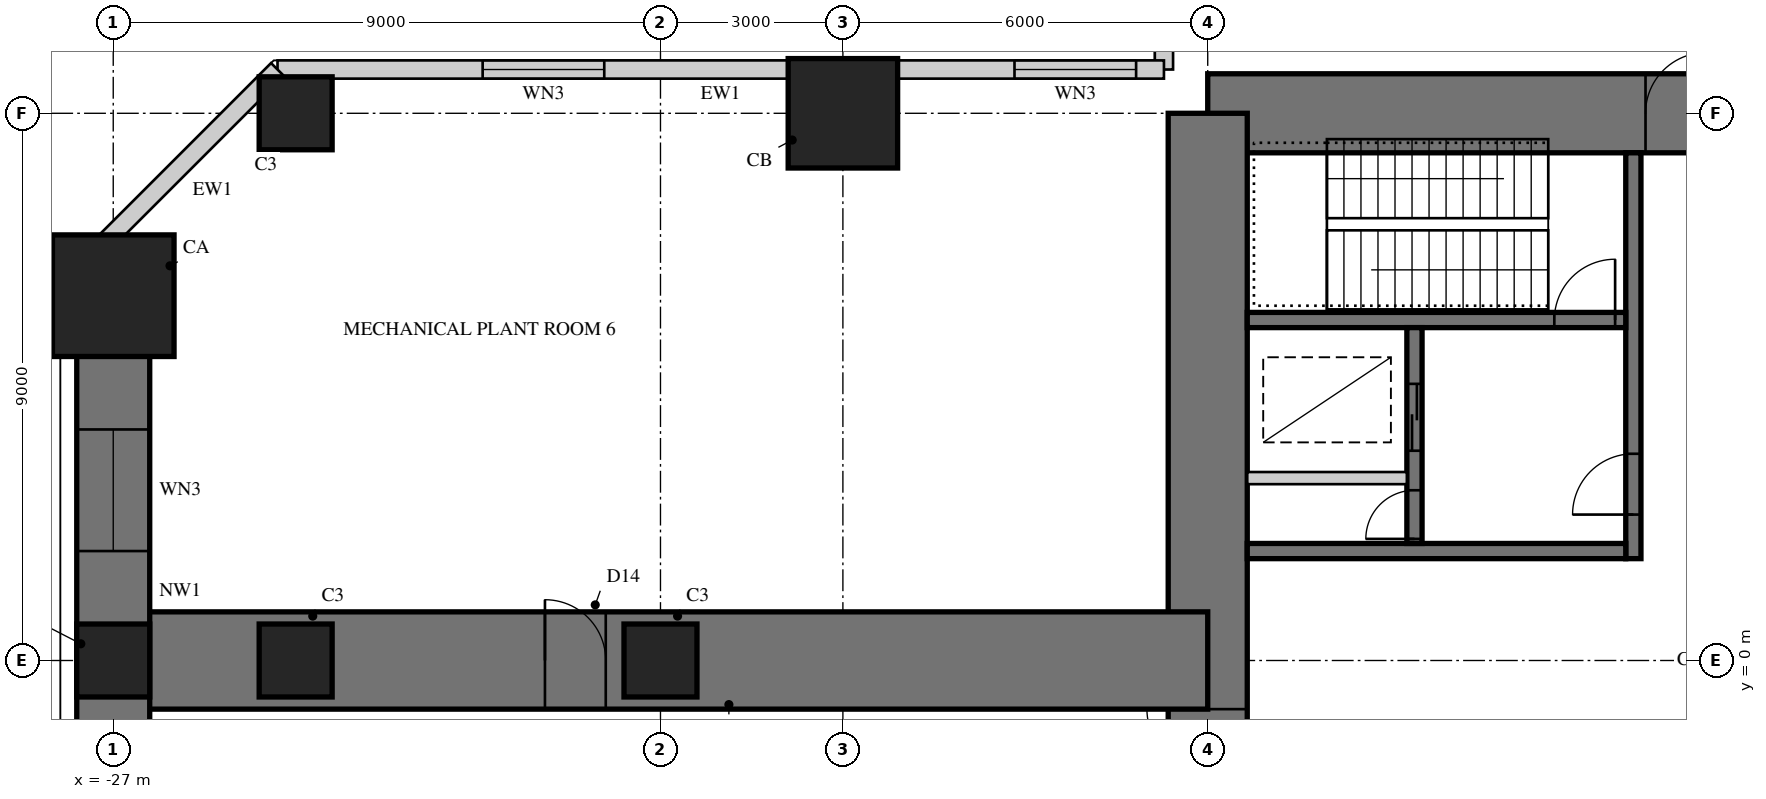
"""IFC4 building model, lengths in metres.
Left out: names, types, materials, properties, quantities, classifications, styles, units other than length and angle.
Written with IfcOpenShell. Run it as: python <this file> out.ifc"""

import sys

from ifc_helpers import new_model, si_unit, direction, frame, frame_2d, origin, origin_2d, place, context, subcontext, project, spatial, rectangle, hollow_rectangle, extrude, element, fill, save


model = new_model("IFC4")
c1 = context("Model", 3, precision=1e-05, world=origin(), true_north=direction((0.0, 1.0)))
c2 = subcontext(c1, "Body", "Model", "MODEL_VIEW")
j1 = project(units=[si_unit("LENGTHUNIT", "METRE"), si_unit("PLANEANGLEUNIT", "RADIAN")], contexts=[c1])
p1 = place(None, origin())
s1 = spatial("IfcSite", under=j1, at=p1, CompositionType="ELEMENT")
p2 = place(p1, origin())
s2 = spatial("IfcBuilding", under=s1, at=p2, CompositionType="ELEMENT")
p3 = place(p2, frame((0.0, 0.0, 18.5)))
s3 = spatial("IfcBuildingStorey", under=s2, at=p3, CompositionType="ELEMENT", Elevation=18.5)
p4 = place(p3, frame((9.0, 9.0, 0.0), z_axis=(0.0, 0.0, 1.0), x_axis=(-1.0, 0.0, 0.0)))
e1 = element("IfcWall", 1, at=p4, inside=s3, PredefinedType="SHEAR", context=c2, shape_type="SweptSolid", body=[
    extrude(rectangle(XDim=18.0, YDim=1.3, at=frame_2d((9.0, 0.0))), origin(), (0.0, 0.0, 1.0), 5.0),
])
p5 = place(p4, frame((9.8, 0.0, 0.0)))
e2 = element("IfcOpeningElement", 2, at=p5, cuts=e1, PredefinedType="OPENING", context=c2, shape_type="SweptSolid", body=[
    extrude(rectangle(XDim=1.0, YDim=2.4, at=frame_2d((0.5, 1.2))), frame((0.0, 0.66, 0.0), z_axis=(0.0, -1.0, 0.0), x_axis=(1.0, 0.0, 0.0)), (0.0, 0.0, 1.0), 1.32),
])
p6 = place(p3, frame((-9.0, 9.0, 0.0), z_axis=(0.0, 0.0, 1.0), x_axis=(0.0, -1.0, 0.0)))
e3 = element("IfcWall", 3, at=p6, inside=s3, PredefinedType="SHEAR", context=c2, shape_type="SweptSolid", body=[
    extrude(rectangle(XDim=18.0, YDim=1.3, at=frame_2d((9.0, 0.0))), origin(), (0.0, 0.0, 1.0), 5.0),
])
p7 = place(p6, frame((9.8, 0.0, 0.0)))
e4 = element("IfcOpeningElement", 4, at=p7, cuts=e3, PredefinedType="OPENING", context=c2, shape_type="SweptSolid", body=[
    extrude(rectangle(XDim=1.0, YDim=2.4, at=frame_2d((0.5, 1.2))), frame((0.0, 0.66, 0.0), z_axis=(0.0, -1.0, 0.0), x_axis=(1.0, 0.0, 0.0)), (0.0, 0.0, 1.0), 1.32),
])
p8 = place(p3, frame((-2.0, 1.675, 0.0), z_axis=(0.0, 0.0, 1.0), x_axis=(0.0, 1.0, 0.0)))
e5 = element("IfcWall", 5, at=p8, inside=s3, PredefinedType="SHEAR", context=c2, shape_type="SweptSolid", body=[
    extrude(rectangle(XDim=6.675, YDim=0.25, at=frame_2d((3.337, 0.0))), origin(), (0.0, 0.0, 1.0), 5.0),
])
p9 = place(p8, frame((0.725, 0.0, 0.0)))
e6 = element("IfcOpeningElement", 6, at=p9, cuts=e5, PredefinedType="OPENING", context=c2, shape_type="SweptSolid", body=[
    extrude(rectangle(XDim=1.0, YDim=2.1, at=frame_2d((0.5, 1.05))), frame((0.0, 0.135, 0.0), z_axis=(0.0, -1.0, 0.0), x_axis=(1.0, 0.0, 0.0)), (0.0, 0.0, 1.0), 0.27),
])
p10 = place(p3, frame((-2.125, 1.8, 0.0), z_axis=(0.0, 0.0, 1.0), x_axis=(-1.0, 0.0, 0.0)))
e7 = element("IfcWall", 7, at=p10, inside=s3, PredefinedType="SHEAR", context=c2, shape_type="SweptSolid", body=[
    extrude(rectangle(XDim=6.225, YDim=0.25, at=frame_2d((3.113, 0.0))), origin(), (0.0, 0.0, 1.0), 5.0),
])
p11 = place(p3, frame((-2.125, 5.6, 0.0), z_axis=(0.0, 0.0, 1.0), x_axis=(-1.0, 0.0, 0.0)))
e8 = element("IfcWall", 8, at=p11, inside=s3, PredefinedType="SHEAR", context=c2, shape_type="SweptSolid", body=[
    extrude(rectangle(XDim=6.225, YDim=0.25, at=frame_2d((3.113, 0.0))), origin(), (0.0, 0.0, 1.0), 5.0),
])
p12 = place(p11, frame((0.175, 0.0, 0.0)))
e9 = element("IfcOpeningElement", 9, at=p12, cuts=e8, PredefinedType="OPENING", context=c2, shape_type="SweptSolid", body=[
    extrude(rectangle(XDim=1.0, YDim=2.1, at=frame_2d((0.5, 1.05))), frame((0.0, 0.135, 0.0), z_axis=(0.0, -1.0, 0.0), x_axis=(1.0, 0.0, 0.0)), (0.0, 0.0, 1.0), 0.27),
])
p13 = place(p3, frame((-5.6, 1.925, 0.0), z_axis=(0.0, 0.0, 1.0), x_axis=(0.0, 1.0, 0.0)))
e10 = element("IfcWall", 10, at=p13, inside=s3, PredefinedType="SHEAR", context=c2, shape_type="SweptSolid", body=[
    extrude(rectangle(XDim=3.55, YDim=0.25, at=frame_2d((1.775, 0.0))), origin(), (0.0, 0.0, 1.0), 5.0),
])
p14 = place(p13, frame((1.525, 0.0, 0.0)))
e11 = element("IfcOpeningElement", 11, at=p14, cuts=e10, PredefinedType="OPENING", context=c2, shape_type="SweptSolid", body=[
    extrude(rectangle(XDim=1.1, YDim=2.2, at=frame_2d((0.55, 1.1))), frame((0.0, 0.135, 0.0), z_axis=(0.0, -1.0, 0.0), x_axis=(1.0, 0.0, 0.0)), (0.0, 0.0, 1.0), 0.27),
])
p15 = place(p13, frame((0.075, 0.0, 0.0)))
e12 = element("IfcOpeningElement", 12, at=p15, cuts=e10, PredefinedType="OPENING", context=c2, shape_type="SweptSolid", body=[
    extrude(rectangle(XDim=0.8, YDim=2.1, at=frame_2d((0.4, 1.05))), frame((0.0, 0.135, 0.0), z_axis=(0.0, -1.0, 0.0), x_axis=(1.0, 0.0, 0.0)), (0.0, 0.0, 1.0), 0.27),
])
p16 = place(p3, frame((-5.725, 3.0, 0.0), z_axis=(0.0, 0.0, 1.0), x_axis=(-1.0, 0.0, 0.0)))
e13 = element("IfcWall", 13, at=p16, inside=s3, PredefinedType="PARTITIONING", context=c2, shape_type="SweptSolid", body=[
    extrude(rectangle(XDim=2.625, YDim=0.2, at=frame_2d((1.312, 0.0))), origin(), (0.0, 0.0, 1.0), 5.0),
])
p17 = place(p3, frame((-9.0, 0.0, 0.0), z_axis=(0.0, 0.0, 1.0), x_axis=(-1.0, 0.0, 0.0)))
e14 = element("IfcWall", 14, at=p17, inside=s3, PredefinedType="SHEAR", context=c2, shape_type="SweptSolid", body=[
    extrude(rectangle(XDim=18.0, YDim=1.6, at=frame_2d((9.0, 0.0))), origin(), (0.0, 0.0, 1.0), 5.0),
])
p18 = place(p17, frame((9.9, 0.0, 0.0)))
e15 = element("IfcOpeningElement", 15, at=p18, cuts=e14, PredefinedType="OPENING", context=c2, shape_type="SweptSolid", body=[
    extrude(rectangle(XDim=1.0, YDim=2.2, at=frame_2d((0.5, 1.1))), frame((0.0, 0.81, 0.0), z_axis=(0.0, -1.0, 0.0), x_axis=(1.0, 0.0, 0.0)), (0.0, 0.0, 1.0), 1.62),
])
p19 = place(p3, frame((-27.0, 6.0, 0.0), z_axis=(0.0, 0.0, 1.0), x_axis=(0.0, -1.0, 0.0)))
e16 = element("IfcWall", 16, at=p19, inside=s3, PredefinedType="SHEAR", context=c2, shape_type="SweptSolid", body=[
    extrude(rectangle(XDim=12.0, YDim=1.2, at=frame_2d((6.0, 0.0))), origin(), (0.0, 0.0, 1.0), 5.0),
])
p20 = place(p19, frame((2.2, 0.0, 0.8)))
e17 = element("IfcOpeningElement", 17, at=p20, cuts=e16, PredefinedType="OPENING", context=c2, shape_type="SweptSolid", body=[
    extrude(rectangle(XDim=2.0, YDim=2.5, at=frame_2d((1.0, 1.25))), frame((0.0, 0.61, 0.0), z_axis=(0.0, -1.0, 0.0), x_axis=(1.0, 0.0, 0.0)), (0.0, 0.0, 1.0), 1.22),
])
p21 = place(p19, frame((7.8, 0.0, 0.8)))
e18 = element("IfcOpeningElement", 18, at=p21, cuts=e16, PredefinedType="OPENING", context=c2, shape_type="SweptSolid", body=[
    extrude(rectangle(XDim=2.0, YDim=2.5, at=frame_2d((1.0, 1.25))), frame((0.0, 0.61, 0.0), z_axis=(0.0, -1.0, 0.0), x_axis=(1.0, 0.0, 0.0)), (0.0, 0.0, 1.0), 1.22),
])
p22 = place(p3, frame((-15.0, 9.0, 0.0), z_axis=(0.0, 0.0, 1.0), x_axis=(1.0, 0.0, 0.0)))
e19 = element("IfcColumn", 19, at=p22, inside=s3, PredefinedType="COLUMN", context=c2, shape_type="SweptSolid", body=[
    extrude(rectangle(XDim=1.8, YDim=1.8, at=origin_2d()), origin(), (0.0, 0.0, 1.0), 5.0),
])
p23 = place(p3, frame((-24.0, 9.0, 0.0), z_axis=(0.0, 0.0, 1.0), x_axis=(1.0, 0.0, 0.0)))
e20 = element("IfcColumn", 20, at=p23, inside=s3, PredefinedType="COLUMN", context=c2, shape_type="SweptSolid", body=[
    extrude(rectangle(XDim=1.2, YDim=1.2, at=origin_2d()), origin(), (0.0, 0.0, 1.0), 5.0),
])
p24 = place(p3, frame((-27.0, 6.0, 0.0), z_axis=(0.0, 0.0, 1.0), x_axis=(1.0, 0.0, 0.0)))
e21 = element("IfcColumn", 21, at=p24, inside=s3, PredefinedType="COLUMN", context=c2, shape_type="SweptSolid", body=[
    extrude(rectangle(XDim=2.0, YDim=2.0, at=origin_2d()), origin(), (0.0, 0.0, 1.0), 5.0),
])
for number, where, z_axis, x_axis in (
    (22, (-27.0, 0.0, 0.0), (0.0, 0.0, 1.0), (1.0, 0.0, 0.0)),
    (23, (-18.0, 0.0, 0.0), (0.0, 0.0, 1.0), (1.0, 0.0, 0.0)),
    (24, (-24.0, 0.0, 0.0), (0.0, 0.0, 1.0), (1.0, 0.0, 0.0)),
):
    element("IfcColumn", number, at=place(p3, frame(where, z_axis=z_axis, x_axis=x_axis)), inside=s3, PredefinedType="COLUMN", context=c2, shape_type="SweptSolid", body=[
        extrude(rectangle(XDim=1.2, YDim=1.2, at=origin_2d()), origin(), (0.0, 0.0, 1.0), 5.0),
    ])
p25 = place(p3, frame((-9.72, 24.298, 0.0), z_axis=(0.0, 0.0, 1.0), x_axis=(0.0, -1.0, 0.0)))
e25 = element("IfcWall", 25, at=p25, inside=s3, PredefinedType="SOLIDWALL", context=c2, shape_type="SweptSolid", body=[
    extrude(rectangle(XDim=14.578, YDim=0.3, at=frame_2d((7.289, 0.0))), origin(), (0.0, 0.0, 1.0), 4.8),
])
p26 = place(p25, frame((3.374, 0.0, 0.8)))
e26 = element("IfcOpeningElement", 26, at=p26, cuts=e25, PredefinedType="OPENING", context=c2, shape_type="SweptSolid", body=[
    extrude(rectangle(XDim=2.0, YDim=2.5, at=frame_2d((1.0, 1.25))), frame((0.0, 0.16, 0.0), z_axis=(0.0, -1.0, 0.0), x_axis=(1.0, 0.0, 0.0)), (0.0, 0.0, 1.0), 0.32),
])
p27 = place(p25, frame((6.289, 0.0, 0.8)))
e27 = element("IfcOpeningElement", 27, at=p27, cuts=e25, PredefinedType="OPENING", context=c2, shape_type="SweptSolid", body=[
    extrude(rectangle(XDim=2.0, YDim=2.5, at=frame_2d((1.0, 1.25))), frame((0.0, 0.16, 0.0), z_axis=(0.0, -1.0, 0.0), x_axis=(1.0, 0.0, 0.0)), (0.0, 0.0, 1.0), 0.32),
])
p28 = place(p25, frame((12.12, 0.0, 0.8)))
e28 = element("IfcOpeningElement", 28, at=p28, cuts=e25, PredefinedType="OPENING", context=c2, shape_type="SweptSolid", body=[
    extrude(rectangle(XDim=2.0, YDim=2.5, at=frame_2d((1.0, 1.25))), frame((0.0, 0.16, 0.0), z_axis=(0.0, -1.0, 0.0), x_axis=(1.0, 0.0, 0.0)), (0.0, 0.0, 1.0), 0.32),
])
p29 = place(p3, frame((-9.72, 9.72, 0.0), z_axis=(0.0, 0.0, 1.0), x_axis=(-1.0, 0.0, 0.0)))
e29 = element("IfcWall", 29, at=p29, inside=s3, PredefinedType="SOLIDWALL", context=c2, shape_type="SweptSolid", body=[
    extrude(rectangle(XDim=14.578, YDim=0.3, at=frame_2d((7.289, 0.0))), origin(), (0.0, 0.0, 1.0), 4.8),
])
p30 = place(p29, frame((0.458, 0.0, 0.8)))
e30 = element("IfcOpeningElement", 30, at=p30, cuts=e29, PredefinedType="OPENING", context=c2, shape_type="SweptSolid", body=[
    extrude(rectangle(XDim=2.0, YDim=2.5, at=frame_2d((1.0, 1.25))), frame((0.0, 0.16, 0.0), z_axis=(0.0, -1.0, 0.0), x_axis=(1.0, 0.0, 0.0)), (0.0, 0.0, 1.0), 0.32),
])
p31 = place(p29, frame((9.205, 0.0, 0.8)))
e31 = element("IfcOpeningElement", 31, at=p31, cuts=e29, PredefinedType="OPENING", context=c2, shape_type="SweptSolid", body=[
    extrude(rectangle(XDim=2.0, YDim=2.5, at=frame_2d((1.0, 1.25))), frame((0.0, 0.16, 0.0), z_axis=(0.0, -1.0, 0.0), x_axis=(1.0, 0.0, 0.0)), (0.0, 0.0, 1.0), 0.32),
])
p32 = place(p3, frame((-24.298, 9.72, 0.0), z_axis=(0.0, 0.0, 1.0), x_axis=(-0.707106781187, -0.707106781187, 0.0)))
e32 = element("IfcWall", 32, at=p32, inside=s3, PredefinedType="SOLIDWALL", context=c2, shape_type="SweptSolid", body=[
    extrude(rectangle(XDim=4.669, YDim=0.3, at=frame_2d((2.335, 0.0))), origin(), (0.0, 0.0, 1.0), 4.8),
])
p33 = place(p30, origin())
e33 = element("IfcWindow", 33, at=p33, inside=s3, PartitioningType="SINGLE_PANEL", PredefinedType="WINDOW", context=c2, shape_type="SweptSolid", body=[
    extrude(hollow_rectangle(XDim=2.0, YDim=2.5, WallThickness=0.06, at=frame_2d((1.0, 1.25))), frame((0.0, 0.03, 0.0), z_axis=(0.0, -1.0, 0.0), x_axis=(1.0, 0.0, 0.0)), (0.0, 0.0, 1.0), 0.06),
    extrude(rectangle(XDim=1.879, YDim=2.379, at=frame_2d((1.0, 1.25))), frame((0.0, 0.03, 0.0), z_axis=(0.0, -1.0, 0.0), x_axis=(1.0, 0.0, 0.0)), (0.0, 0.0, 1.0), 0.06),
])
fill(e30, e33)
p34 = place(p31, origin())
e34 = element("IfcWindow", 34, at=p34, inside=s3, PartitioningType="SINGLE_PANEL", PredefinedType="WINDOW", context=c2, shape_type="SweptSolid", body=[
    extrude(hollow_rectangle(XDim=2.0, YDim=2.5, WallThickness=0.06, at=frame_2d((1.0, 1.25))), frame((0.0, 0.03, 0.0), z_axis=(0.0, -1.0, 0.0), x_axis=(1.0, 0.0, 0.0)), (0.0, 0.0, 1.0), 0.06),
    extrude(rectangle(XDim=1.879, YDim=2.379, at=frame_2d((1.0, 1.25))), frame((0.0, 0.03, 0.0), z_axis=(0.0, -1.0, 0.0), x_axis=(1.0, 0.0, 0.0)), (0.0, 0.0, 1.0), 0.06),
])
fill(e31, e34)
p35 = place(p20, origin())
e35 = element("IfcWindow", 35, at=p35, inside=s3, PartitioningType="SINGLE_PANEL", PredefinedType="WINDOW", context=c2, shape_type="SweptSolid", body=[
    extrude(hollow_rectangle(XDim=2.0, YDim=2.5, WallThickness=0.06, at=frame_2d((1.0, 1.25))), frame((0.0, 0.03, 0.0), z_axis=(0.0, -1.0, 0.0), x_axis=(1.0, 0.0, 0.0)), (0.0, 0.0, 1.0), 0.06),
    extrude(rectangle(XDim=1.879, YDim=2.379, at=frame_2d((1.0, 1.25))), frame((0.0, 0.03, 0.0), z_axis=(0.0, -1.0, 0.0), x_axis=(1.0, 0.0, 0.0)), (0.0, 0.0, 1.0), 0.06),
])
fill(e17, e35)
p36 = place(p18, frame((1.0, 0.0, 0.0), z_axis=(0.0, 0.0, 1.0), x_axis=(-1.0, 0.0, 0.0)))
e36 = element("IfcDoor", 36, at=p36, inside=s3, OperationType="SINGLE_SWING_LEFT", PredefinedType="DOOR", context=c2, shape_type="SweptSolid", body=[
    extrude(rectangle(XDim=1.0, YDim=2.2, at=frame_2d((0.5, 1.1))), frame((0.0, 0.025, 0.0), z_axis=(0.0, -1.0, 0.0), x_axis=(1.0, 0.0, 0.0)), (0.0, 0.0, 1.0), 0.05),
])
fill(e15, e36)
p37 = place(p5, frame((1.0, 0.0, 0.0), z_axis=(0.0, 0.0, 1.0), x_axis=(-1.0, 0.0, 0.0)))
e37 = element("IfcDoor", 37, at=p37, inside=s3, OperationType="SINGLE_SWING_RIGHT", PredefinedType="DOOR", context=c2, shape_type="SweptSolid", body=[
    extrude(rectangle(XDim=1.0, YDim=2.4, at=frame_2d((0.5, 1.2))), frame((0.0, -0.005, 0.0), z_axis=(0.0, -1.0, 0.0), x_axis=(1.0, 0.0, 0.0)), (0.0, 0.0, 1.0), 0.05),
])
fill(e2, e37)
p38 = place(p7, frame((1.0, 0.0, 0.0), z_axis=(0.0, 0.0, 1.0), x_axis=(-1.0, 0.0, 0.0)))
e38 = element("IfcDoor", 38, at=p38, inside=s3, OperationType="SINGLE_SWING_RIGHT", PredefinedType="DOOR", context=c2, shape_type="SweptSolid", body=[
    extrude(rectangle(XDim=1.0, YDim=2.4, at=frame_2d((0.5, 1.2))), frame((0.0, -0.005, 0.0), z_axis=(0.0, -1.0, 0.0), x_axis=(1.0, 0.0, 0.0)), (0.0, 0.0, 1.0), 0.05),
])
fill(e4, e38)
p39 = place(p9, origin())
e39 = element("IfcDoor", 39, at=p39, inside=s3, OperationType="SINGLE_SWING_LEFT", PredefinedType="DOOR", context=c2, shape_type="SweptSolid", body=[
    extrude(rectangle(XDim=1.0, YDim=2.1, at=frame_2d((0.5, 1.05))), frame((0.0, 0.025, 0.0), z_axis=(0.0, -1.0, 0.0), x_axis=(1.0, 0.0, 0.0)), (0.0, 0.0, 1.0), 0.05),
])
fill(e6, e39)
p40 = place(p12, frame((1.0, 0.0, 0.0), z_axis=(0.0, 0.0, 1.0), x_axis=(-1.0, 0.0, 0.0)))
e40 = element("IfcDoor", 40, at=p40, inside=s3, OperationType="SINGLE_SWING_RIGHT", PredefinedType="DOOR", context=c2, shape_type="SweptSolid", body=[
    extrude(rectangle(XDim=1.0, YDim=2.1, at=frame_2d((0.5, 1.05))), frame((0.0, 0.025, 0.0), z_axis=(0.0, -1.0, 0.0), x_axis=(1.0, 0.0, 0.0)), (0.0, 0.0, 1.0), 0.05),
])
fill(e9, e40)
p41 = place(p14, origin())
e41 = element("IfcDoor", 41, at=p41, inside=s3, OperationType="DOUBLE_DOOR_SLIDING", PredefinedType="DOOR", context=c2, shape_type="SweptSolid", body=[
    extrude(rectangle(XDim=1.1, YDim=2.2, at=frame_2d((0.55, 1.1))), frame((0.0, 0.025, 0.0), z_axis=(0.0, -1.0, 0.0), x_axis=(1.0, 0.0, 0.0)), (0.0, 0.0, 1.0), 0.05),
])
fill(e11, e41)
p42 = place(p15, origin())
e42 = element("IfcDoor", 42, at=p42, inside=s3, OperationType="SINGLE_SWING_LEFT", PredefinedType="DOOR", context=c2, shape_type="SweptSolid", body=[
    extrude(rectangle(XDim=0.8, YDim=2.1, at=frame_2d((0.4, 1.05))), frame((0.0, 0.025, 0.0), z_axis=(0.0, -1.0, 0.0), x_axis=(1.0, 0.0, 0.0)), (0.0, 0.0, 1.0), 0.05),
])
fill(e12, e42)
save(model, sys.argv[1])
